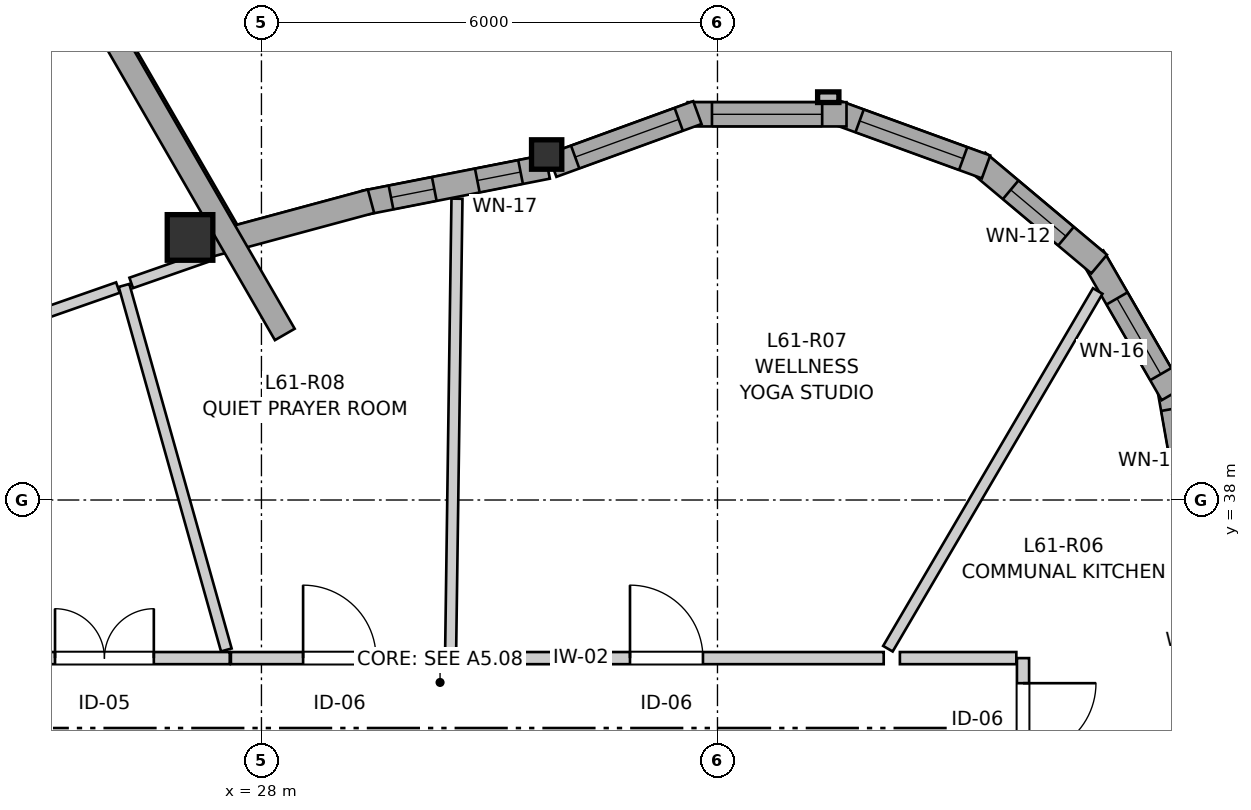
"""IFC4 building model, lengths in metres.
Left out: names, types, materials, properties, quantities, classifications, styles, units other than length and angle.
Written with IfcOpenShell. Run it as: python <this file> out.ifc"""

import sys

from ifc_helpers import new_model, si_unit, direction, frame, frame_2d, origin, origin_2d, place, context, subcontext, project, spatial, rectangle, i_section, extrude, source, transform, mapped, element, fill, save


model = new_model("IFC4")
c1 = context("Model", 3, precision=1e-05, world=origin(), true_north=direction((0.0, 1.0)))
c2 = subcontext(c1, "Body", "Model", "MODEL_VIEW")
j1 = project(units=[si_unit("LENGTHUNIT", "METRE"), si_unit("PLANEANGLEUNIT", "RADIAN")], contexts=[c1])
p1 = place(None, origin())
s1 = spatial("IfcSite", under=j1, at=p1, CompositionType="ELEMENT")
p2 = place(p1, origin())
s2 = spatial("IfcBuilding", under=s1, at=p2, CompositionType="ELEMENT")
p3 = place(p2, frame((0.0, 0.0, 205.2)))
s3 = spatial("IfcBuildingStorey", under=s2, at=p3, CompositionType="ELEMENT", Elevation=205.2)
m1 = source(origin(), c2, "Body", "SweptSolid", [
    extrude(i_section(OverallWidth=0.398, OverallDepth=0.387, WebThickness=0.019, FlangeThickness=0.03, FilletRadius=0.015, at=origin_2d()), origin(), (0.0, 0.0, 1.0), 2.935),
])
p4 = place(p3, frame((31.752, 42.545, 0.0), z_axis=(0.0, 0.0, 1.0), x_axis=(1.0, 0.0, 0.0)))
e1 = element("IfcColumn", 1, at=p4, inside=s3, PredefinedType="PILASTER", context=c2, shape_type="MappedRepresentation", body=[
    mapped(m1, transform((0.0, 0.0, 0.0), x_axis=(1.0, 0.0, 0.0), y_axis=(0.0, 1.0, 0.0), z_axis=(0.0, 0.0, 1.0), scale=1.0)),
])
m2 = source(origin(), c2, "Body", "SweptSolid", [
    extrude(rectangle(XDim=0.6, YDim=0.6, at=origin_2d()), origin(), (0.0, 0.0, 1.0), 2.935),
])
p5 = place(p3, frame((27.06, 41.454, 0.0), z_axis=(0.0, 0.0, 1.0), x_axis=(1.0, 0.0, 0.0)))
e2 = element("IfcColumn", 2, at=p5, inside=s3, PredefinedType="COLUMN", context=c2, shape_type="MappedRepresentation", body=[
    mapped(m2, transform((0.0, 0.0, 0.0), x_axis=(1.0, 0.0, 0.0), y_axis=(0.0, 1.0, 0.0), z_axis=(0.0, 0.0, 1.0), scale=1.0)),
])
p6 = place(p3, frame((40.279, 37.583, 0.0), z_axis=(0.0, 0.0, 1.0), x_axis=(-0.173671780312, 0.984803590937, 0.0)))
e3 = element("IfcWall", 3, at=p6, inside=s3, PredefinedType="SOLIDWALL", context=c2, shape_type="SweptSolid", body=[
    extrude(rectangle(XDim=1.962, YDim=0.32, at=frame_2d((0.981, 0.0))), origin(), (0.0, 0.0, 1.0), 2.555),
])
p7 = place(p6, frame((0.391, 0.0, 0.82)))
e4 = element("IfcOpeningElement", 4, at=p7, cuts=e3, PredefinedType="OPENING", context=c2, shape_type="SweptSolid", body=[
    extrude(rectangle(XDim=1.25, YDim=1.35, at=frame_2d((0.625, 0.675))), frame((0.0, 0.17, 0.0), z_axis=(0.0, -1.0, 0.0), x_axis=(1.0, 0.0, 0.0)), (0.0, 0.0, 1.0), 0.34),
])
p8 = place(p3, frame((39.983, 39.393, 0.0), z_axis=(0.0, 0.0, 1.0), x_axis=(-0.499995423472, 0.866028046028, 0.0)))
e5 = element("IfcWall", 5, at=p8, inside=s3, PredefinedType="SOLIDWALL", context=c2, shape_type="SweptSolid", body=[
    extrude(rectangle(XDim=2.09, YDim=0.32, at=frame_2d((1.045, 0.0))), origin(), (0.0, 0.0, 1.0), 2.555),
])
p9 = place(p8, frame((0.303, 0.0, 0.82)))
e6 = element("IfcOpeningElement", 6, at=p9, cuts=e5, PredefinedType="OPENING", context=c2, shape_type="SweptSolid", body=[
    extrude(rectangle(XDim=1.15, YDim=1.2, at=frame_2d((0.575, 0.6))), frame((0.0, 0.17, 0.0), z_axis=(0.0, -1.0, 0.0), x_axis=(1.0, 0.0, 0.0)), (0.0, 0.0, 1.0), 0.34),
])
p10 = place(p3, frame((39.022, 41.104, 0.0), z_axis=(0.0, 0.0, 1.0), x_axis=(-0.766072824549, 0.642753784499, 0.0)))
e7 = element("IfcWall", 7, at=p10, inside=s3, PredefinedType="SOLIDWALL", context=c2, shape_type="SweptSolid", body=[
    extrude(rectangle(XDim=2.091, YDim=0.32, at=frame_2d((1.045, 0.0))), origin(), (0.0, 0.0, 1.0), 2.555),
])
p11 = place(p10, frame((0.57, 0.0, 0.82)))
e8 = element("IfcOpeningElement", 8, at=p11, cuts=e7, PredefinedType="OPENING", context=c2, shape_type="SweptSolid", body=[
    extrude(rectangle(XDim=0.95, YDim=1.35, at=frame_2d((0.475, 0.675))), frame((0.0, 0.17, 0.0), z_axis=(0.0, -1.0, 0.0), x_axis=(1.0, 0.0, 0.0)), (0.0, 0.0, 1.0), 0.34),
])
p12 = place(p3, frame((37.533, 42.382, 0.0), z_axis=(0.0, 0.0, 1.0), x_axis=(-0.939697896412, 0.342005648315, 0.0)))
e9 = element("IfcWall", 9, at=p12, inside=s3, PredefinedType="SOLIDWALL", context=c2, shape_type="SweptSolid", body=[
    extrude(rectangle(XDim=2.09, YDim=0.32, at=frame_2d((1.045, 0.0))), origin(), (0.0, 0.0, 1.0), 2.555),
])
p13 = place(p12, frame((0.32, 0.0, 0.82)))
e10 = element("IfcOpeningElement", 10, at=p13, cuts=e9, PredefinedType="OPENING", context=c2, shape_type="SweptSolid", body=[
    extrude(rectangle(XDim=1.45, YDim=1.25, at=frame_2d((0.725, 0.625))), frame((0.0, 0.17, 0.0), z_axis=(0.0, -1.0, 0.0), x_axis=(1.0, 0.0, 0.0)), (0.0, 0.0, 1.0), 0.34),
])
p14 = place(p3, frame((35.698, 43.074, 0.0), z_axis=(0.0, 0.0, 1.0), x_axis=(-1.0, 0.0, 0.0)))
e11 = element("IfcWall", 11, at=p14, inside=s3, PredefinedType="SOLIDWALL", context=c2, shape_type="SweptSolid", body=[
    extrude(rectangle(XDim=2.09, YDim=0.32, at=frame_2d((1.045, 0.0))), origin(), (0.0, 0.0, 1.0), 2.555),
])
p15 = place(p14, frame((0.32, 0.0, 0.82)))
e12 = element("IfcOpeningElement", 12, at=p15, cuts=e11, PredefinedType="OPENING", context=c2, shape_type="SweptSolid", body=[
    extrude(rectangle(XDim=1.45, YDim=1.25, at=frame_2d((0.725, 0.625))), frame((0.0, 0.17, 0.0), z_axis=(0.0, -1.0, 0.0), x_axis=(1.0, 0.0, 0.0)), (0.0, 0.0, 1.0), 0.34),
])
p16 = place(p3, frame((33.736, 43.097, 0.0), z_axis=(0.0, 0.0, 1.0), x_axis=(-0.939691662178, -0.342022777067, 0.0)))
e13 = element("IfcWall", 13, at=p16, inside=s3, PredefinedType="SOLIDWALL", context=c2, shape_type="SweptSolid", body=[
    extrude(rectangle(XDim=2.032, YDim=0.32, at=frame_2d((1.016, 0.0))), origin(), (0.0, 0.0, 1.0), 2.555),
])
p17 = place(p16, frame((0.261, 0.0, 0.82)))
e14 = element("IfcOpeningElement", 14, at=p17, cuts=e13, PredefinedType="OPENING", context=c2, shape_type="SweptSolid", body=[
    extrude(rectangle(XDim=1.45, YDim=1.25, at=frame_2d((0.725, 0.625))), frame((0.0, 0.17, 0.0), z_axis=(0.0, -1.0, 0.0), x_axis=(1.0, 0.0, 0.0)), (0.0, 0.0, 1.0), 0.34),
])
p18 = place(p3, frame((31.764, 42.385, 0.0), z_axis=(0.0, 0.0, 1.0), x_axis=(-0.981229659911, -0.192842823335, 0.0)))
e15 = element("IfcWall", 15, at=p18, inside=s3, PredefinedType="SOLIDWALL", context=c2, shape_type="SweptSolid", body=[
    extrude(rectangle(XDim=2.454, YDim=0.32, at=frame_2d((1.227, 0.0))), origin(), (0.0, 0.0, 1.0), 2.555),
])
p19 = place(p18, frame((0.361, 0.0, 0.82)))
e16 = element("IfcOpeningElement", 16, at=p19, cuts=e15, PredefinedType="OPENING", context=c2, shape_type="SweptSolid", body=[
    extrude(rectangle(XDim=0.58, YDim=1.35, at=frame_2d((0.29, 0.675))), frame((0.0, 0.17, 0.0), z_axis=(0.0, -1.0, 0.0), x_axis=(1.0, 0.0, 0.0)), (0.0, 0.0, 1.0), 0.34),
])
p20 = place(p18, frame((1.518, 0.0, 0.82)))
e17 = element("IfcOpeningElement", 17, at=p20, cuts=e15, PredefinedType="OPENING", context=c2, shape_type="SweptSolid", body=[
    extrude(rectangle(XDim=0.58, YDim=1.35, at=frame_2d((0.29, 0.675))), frame((0.0, 0.17, 0.0), z_axis=(0.0, -1.0, 0.0), x_axis=(1.0, 0.0, 0.0)), (0.0, 0.0, 1.0), 0.34),
])
p21 = place(p3, frame((29.441, 41.931, 0.0), z_axis=(0.0, 0.0, 1.0), x_axis=(-0.965448832587, -0.260592693023, 0.0)))
e18 = element("IfcWall", 18, at=p21, inside=s3, PredefinedType="SOLIDWALL", context=c2, shape_type="SweptSolid", body=[
    extrude(rectangle(XDim=2.333, YDim=0.32, at=frame_2d((1.167, 0.0))), origin(), (0.0, 0.0, 1.0), 2.555),
])
p22 = place(p3, frame((28.307, 40.178, 0.0), z_axis=(0.0, 0.0, 1.0), x_axis=(-0.500003467681, 0.866023401709, 0.0)))
e19 = element("IfcWall", 19, at=p22, inside=s3, PredefinedType="SOLIDWALL", context=c2, shape_type="SweptSolid", body=[
    extrude(rectangle(XDim=19.929, YDim=0.3, at=frame_2d((9.964, 0.0))), origin(), (0.0, 0.0, 1.0), 2.115),
])
p23 = place(p3, frame((30.474, 35.92, 0.0), z_axis=(0.0, 0.0, 1.0), x_axis=(1.0, 0.0, 0.0)))
e20 = element("IfcWall", 20, at=p23, inside=s3, PredefinedType="PARTITIONING", context=c2, shape_type="SweptSolid", body=[
    extrude(rectangle(XDim=5.713, YDim=0.16, at=frame_2d((2.856, 0.0))), origin(), (0.0, 0.0, 1.0), 2.935),
])
p24 = place(p23, frame((2.375, 0.0, 0.0)))
e21 = element("IfcOpeningElement", 21, at=p24, cuts=e20, PredefinedType="OPENING", context=c2, shape_type="SweptSolid", body=[
    extrude(rectangle(XDim=0.96, YDim=2.1, at=frame_2d((0.48, 1.05))), frame((0.0, 0.09, 0.0), z_axis=(0.0, -1.0, 0.0), x_axis=(1.0, 0.0, 0.0)), (0.0, 0.0, 1.0), 0.18),
])
p25 = place(p3, frame((24.3, 35.92, 0.0), z_axis=(0.0, 0.0, 1.0), x_axis=(1.0, 0.0, 0.0)))
e22 = element("IfcWall", 22, at=p25, inside=s3, PredefinedType="PARTITIONING", context=c2, shape_type="SweptSolid", body=[
    extrude(rectangle(XDim=3.283, YDim=0.16, at=frame_2d((1.642, 0.0))), origin(), (0.0, 0.0, 1.0), 2.935),
])
p26 = place(p25, frame((0.984, 0.0, 0.0)))
e23 = element("IfcOpeningElement", 23, at=p26, cuts=e22, PredefinedType="OPENING", context=c2, shape_type="SweptSolid", body=[
    extrude(rectangle(XDim=1.3, YDim=2.1, at=frame_2d((0.65, 1.05))), frame((0.0, 0.09, 0.0), z_axis=(0.0, -1.0, 0.0), x_axis=(1.0, 0.0, 0.0)), (0.0, 0.0, 1.0), 0.18),
])
p27 = place(p3, frame((27.598, 35.92, 0.0), z_axis=(0.0, 0.0, 1.0), x_axis=(1.0, 0.0, 0.0)))
e24 = element("IfcWall", 24, at=p27, inside=s3, PredefinedType="PARTITIONING", context=c2, shape_type="SweptSolid", body=[
    extrude(rectangle(XDim=2.861, YDim=0.16, at=frame_2d((1.431, 0.0))), origin(), (0.0, 0.0, 1.0), 2.935),
])
p28 = place(p27, frame((0.95, 0.0, 0.0)))
e25 = element("IfcOpeningElement", 25, at=p28, cuts=e24, PredefinedType="OPENING", context=c2, shape_type="SweptSolid", body=[
    extrude(rectangle(XDim=0.96, YDim=2.1, at=frame_2d((0.48, 1.05))), frame((0.0, 0.09, 0.0), z_axis=(0.0, -1.0, 0.0), x_axis=(1.0, 0.0, 0.0)), (0.0, 0.0, 1.0), 0.18),
])
p29 = place(p3, frame((38.02, 35.92, 0.0), z_axis=(0.0, 0.0, 1.0), x_axis=(0.0, -1.0, 0.0)))
e26 = element("IfcWall", 26, at=p29, inside=s3, PredefinedType="PARTITIONING", context=c2, shape_type="SweptSolid", body=[
    extrude(rectangle(XDim=1.62, YDim=0.16, at=frame_2d((0.81, 0.0))), origin(), (0.0, 0.0, 1.0), 2.603),
])
p30 = place(p29, frame((0.33, 0.0, 0.0)))
e27 = element("IfcOpeningElement", 27, at=p30, cuts=e26, PredefinedType="OPENING", context=c2, shape_type="SweptSolid", body=[
    extrude(rectangle(XDim=0.96, YDim=2.1, at=frame_2d((0.48, 1.05))), frame((0.0, 0.09, 0.0), z_axis=(0.0, -1.0, 0.0), x_axis=(1.0, 0.0, 0.0)), (0.0, 0.0, 1.0), 0.18),
])
p31 = place(p3, frame((30.489, 36.009, 0.0), z_axis=(0.0, 0.0, 1.0), x_axis=(0.013978627514, 0.999902294213, 0.0)))
e28 = element("IfcWall", 28, at=p31, inside=s3, PredefinedType="PARTITIONING", context=c2, shape_type="SweptSolid", body=[
    extrude(rectangle(XDim=5.956, YDim=0.145, at=frame_2d((2.978, 0.0))), origin(), (0.0, 0.0, 1.0), 2.935),
])
p32 = place(p3, frame((36.242, 36.044, 0.0), z_axis=(0.0, 0.0, 1.0), x_axis=(0.50599508157, 0.862536362959, 0.0)))
e29 = element("IfcWall", 29, at=p32, inside=s3, PredefinedType="PARTITIONING", context=c2, shape_type="SweptSolid", body=[
    extrude(rectangle(XDim=5.456, YDim=0.145, at=frame_2d((2.728, 0.0))), origin(), (0.0, 0.0, 1.0), 2.935),
])
p33 = place(p3, frame((26.192, 40.823, 0.0), z_axis=(0.0, 0.0, 1.0), x_axis=(0.270218926069, -0.962798905273, 0.0)))
e30 = element("IfcWall", 30, at=p33, inside=s3, PredefinedType="PARTITIONING", context=c2, shape_type="SweptSolid", body=[
    extrude(rectangle(XDim=4.981, YDim=0.145, at=frame_2d((2.49, 0.0))), origin(), (0.0, 0.0, 1.0), 2.935),
])
p34 = place(p3, frame((38.154, 32.845, 0.0), z_axis=(0.0, 0.0, 1.0), x_axis=(0.751793032372, 0.659399148071, 0.0)))
e31 = element("IfcWall", 31, at=p34, inside=s3, PredefinedType="PARTITIONING", context=c2, shape_type="SweptSolid", body=[
    extrude(rectangle(XDim=3.631, YDim=0.145, at=frame_2d((1.815, 0.0))), origin(), (0.0, 0.0, 1.0), 2.935),
])
p35 = place(p3, frame((36.4, 35.92, 0.0), z_axis=(0.0, 0.0, 1.0), x_axis=(1.0, 0.0, 0.0)))
e32 = element("IfcWall", 32, at=p35, inside=s3, PredefinedType="PARTITIONING", context=c2, shape_type="SweptSolid", body=[
    extrude(rectangle(XDim=1.532, YDim=0.16, at=frame_2d((0.766, 0.0))), origin(), (0.0, 0.0, 1.0), 2.935),
])
p36 = place(p3, frame((24.973, 40.397, 0.0), z_axis=(0.0, 0.0, 1.0), x_axis=(0.943987684609, 0.329980683232, 0.0)))
e33 = element("IfcWall", 33, at=p36, inside=s3, PredefinedType="PARTITIONING", context=c2, shape_type="SweptSolid", body=[
    extrude(rectangle(XDim=1.206, YDim=0.145, at=frame_2d((0.603, 0.0))), origin(), (0.0, 0.0, 1.0), 2.543),
])
p37 = place(p3, frame((26.287, 40.856, 0.0), z_axis=(0.0, 0.0, 1.0), x_axis=(0.944089421658, 0.329689496214, 0.0)))
e34 = element("IfcWall", 34, at=p37, inside=s3, PredefinedType="PARTITIONING", context=c2, shape_type="SweptSolid", body=[
    extrude(rectangle(XDim=1.037, YDim=0.145, at=frame_2d((0.518, 0.0))), origin(), (0.0, 0.0, 1.0), 2.543),
])
m3 = source(origin(), c2, "Body", "SweptSolid", [
    extrude(rectangle(XDim=1.25, YDim=1.35, at=frame_2d((0.625, 0.675))), frame((0.0, 0.03, 0.0), z_axis=(0.0, -1.0, 0.0), x_axis=(1.0, 0.0, 0.0)), (0.0, 0.0, 1.0), 0.06),
])
p38 = place(p7, origin())
e35 = element("IfcWindow", 35, at=p38, inside=s3, PartitioningType="SINGLE_PANEL", PredefinedType="WINDOW", context=c2, shape_type="MappedRepresentation", body=[
    mapped(m3, transform((0.0, 0.0, 0.0), x_axis=(1.0, 0.0, 0.0), y_axis=(0.0, 1.0, 0.0), z_axis=(0.0, 0.0, 1.0), scale=1.0)),
])
fill(e4, e35)
m4 = source(origin(), c2, "Body", "SweptSolid", [
    extrude(rectangle(XDim=1.15, YDim=1.2, at=frame_2d((0.575, 0.6))), frame((0.0, 0.03, 0.0), z_axis=(0.0, -1.0, 0.0), x_axis=(1.0, 0.0, 0.0)), (0.0, 0.0, 1.0), 0.06),
])
p39 = place(p9, origin())
e36 = element("IfcWindow", 36, at=p39, inside=s3, PartitioningType="SINGLE_PANEL", PredefinedType="WINDOW", context=c2, shape_type="MappedRepresentation", body=[
    mapped(m4, transform((0.0, 0.0, 0.0), x_axis=(1.0, 0.0, 0.0), y_axis=(0.0, 1.0, 0.0), z_axis=(0.0, 0.0, 1.0), scale=1.0)),
])
fill(e6, e36)
m5 = source(origin(), c2, "Body", "SweptSolid", [
    extrude(rectangle(XDim=0.95, YDim=1.35, at=frame_2d((0.475, 0.675))), frame((0.0, 0.03, 0.0), z_axis=(0.0, -1.0, 0.0), x_axis=(1.0, 0.0, 0.0)), (0.0, 0.0, 1.0), 0.06),
])
p40 = place(p11, origin())
e37 = element("IfcWindow", 37, at=p40, inside=s3, PartitioningType="SINGLE_PANEL", PredefinedType="WINDOW", context=c2, shape_type="MappedRepresentation", body=[
    mapped(m5, transform((0.0, 0.0, 0.0), x_axis=(1.0, 0.0, 0.0), y_axis=(0.0, 1.0, 0.0), z_axis=(0.0, 0.0, 1.0), scale=1.0)),
])
fill(e8, e37)
m6 = source(origin(), c2, "Body", "SweptSolid", [
    extrude(rectangle(XDim=1.45, YDim=1.25, at=frame_2d((0.725, 0.625))), frame((0.0, 0.03, 0.0), z_axis=(0.0, -1.0, 0.0), x_axis=(1.0, 0.0, 0.0)), (0.0, 0.0, 1.0), 0.06),
])
p41 = place(p13, origin())
e38 = element("IfcWindow", 38, at=p41, inside=s3, PartitioningType="SINGLE_PANEL", PredefinedType="WINDOW", context=c2, shape_type="MappedRepresentation", body=[
    mapped(m6, transform((0.0, 0.0, 0.0), x_axis=(1.0, 0.0, 0.0), y_axis=(0.0, 1.0, 0.0), z_axis=(0.0, 0.0, 1.0), scale=1.0)),
])
fill(e10, e38)
p42 = place(p15, origin())
e39 = element("IfcWindow", 39, at=p42, inside=s3, PartitioningType="SINGLE_PANEL", PredefinedType="WINDOW", context=c2, shape_type="MappedRepresentation", body=[
    mapped(m6, transform((0.0, 0.0, 0.0), x_axis=(1.0, 0.0, 0.0), y_axis=(0.0, 1.0, 0.0), z_axis=(0.0, 0.0, 1.0), scale=1.0)),
])
fill(e12, e39)
p43 = place(p17, origin())
e40 = element("IfcWindow", 40, at=p43, inside=s3, PartitioningType="SINGLE_PANEL", PredefinedType="WINDOW", context=c2, shape_type="MappedRepresentation", body=[
    mapped(m6, transform((0.0, 0.0, 0.0), x_axis=(1.0, 0.0, 0.0), y_axis=(0.0, 1.0, 0.0), z_axis=(0.0, 0.0, 1.0), scale=1.0)),
])
fill(e14, e40)
m7 = source(origin(), c2, "Body", "SweptSolid", [
    extrude(rectangle(XDim=0.58, YDim=1.35, at=frame_2d((0.29, 0.675))), frame((0.0, 0.03, 0.0), z_axis=(0.0, -1.0, 0.0), x_axis=(1.0, 0.0, 0.0)), (0.0, 0.0, 1.0), 0.06),
])
p44 = place(p19, origin())
e41 = element("IfcWindow", 41, at=p44, inside=s3, PartitioningType="SINGLE_PANEL", PredefinedType="WINDOW", context=c2, shape_type="MappedRepresentation", body=[
    mapped(m7, transform((0.0, 0.0, 0.0), x_axis=(1.0, 0.0, 0.0), y_axis=(0.0, 1.0, 0.0), z_axis=(0.0, 0.0, 1.0), scale=1.0)),
])
fill(e16, e41)
p45 = place(p20, origin())
e42 = element("IfcWindow", 42, at=p45, inside=s3, PartitioningType="SINGLE_PANEL", PredefinedType="WINDOW", context=c2, shape_type="MappedRepresentation", body=[
    mapped(m7, transform((0.0, 0.0, 0.0), x_axis=(1.0, 0.0, 0.0), y_axis=(0.0, 1.0, 0.0), z_axis=(0.0, 0.0, 1.0), scale=1.0)),
])
fill(e17, e42)
m8 = source(origin(), c2, "Body", "SweptSolid", [
    extrude(rectangle(XDim=0.96, YDim=2.1, at=frame_2d((0.48, 1.05))), frame((0.0, 0.025, 0.0), z_axis=(0.0, -1.0, 0.0), x_axis=(1.0, 0.0, 0.0)), (0.0, 0.0, 1.0), 0.05),
])
p46 = place(p24, origin())
e43 = element("IfcDoor", 43, at=p46, inside=s3, OperationType="SINGLE_SWING_LEFT", PredefinedType="DOOR", context=c2, shape_type="MappedRepresentation", body=[
    mapped(m8, transform((0.0, 0.0, 0.0), x_axis=(1.0, 0.0, 0.0), y_axis=(0.0, 1.0, 0.0), z_axis=(0.0, 0.0, 1.0), scale=1.0)),
])
fill(e21, e43)
m9 = source(origin(), c2, "Body", "SweptSolid", [
    extrude(rectangle(XDim=1.3, YDim=2.1, at=frame_2d((0.65, 1.05))), frame((0.0, 0.025, 0.0), z_axis=(0.0, -1.0, 0.0), x_axis=(1.0, 0.0, 0.0)), (0.0, 0.0, 1.0), 0.05),
])
p47 = place(p26, origin())
e44 = element("IfcDoor", 44, at=p47, inside=s3, OperationType="DOUBLE_DOOR_SINGLE_SWING", PredefinedType="DOOR", context=c2, shape_type="MappedRepresentation", body=[
    mapped(m9, transform((0.0, 0.0, 0.0), x_axis=(1.0, 0.0, 0.0), y_axis=(0.0, 1.0, 0.0), z_axis=(0.0, 0.0, 1.0), scale=1.0)),
])
fill(e23, e44)
p48 = place(p28, origin())
e45 = element("IfcDoor", 45, at=p48, inside=s3, OperationType="SINGLE_SWING_LEFT", PredefinedType="DOOR", context=c2, shape_type="MappedRepresentation", body=[
    mapped(m8, transform((0.0, 0.0, 0.0), x_axis=(1.0, 0.0, 0.0), y_axis=(0.0, 1.0, 0.0), z_axis=(0.0, 0.0, 1.0), scale=1.0)),
])
fill(e25, e45)
p49 = place(p30, origin())
e46 = element("IfcDoor", 46, at=p49, inside=s3, OperationType="SINGLE_SWING_LEFT", PredefinedType="DOOR", context=c2, shape_type="MappedRepresentation", body=[
    mapped(m8, transform((0.0, 0.0, 0.0), x_axis=(1.0, 0.0, 0.0), y_axis=(0.0, 1.0, 0.0), z_axis=(0.0, 0.0, 1.0), scale=1.0)),
])
fill(e27, e46)
save(model, sys.argv[1])
